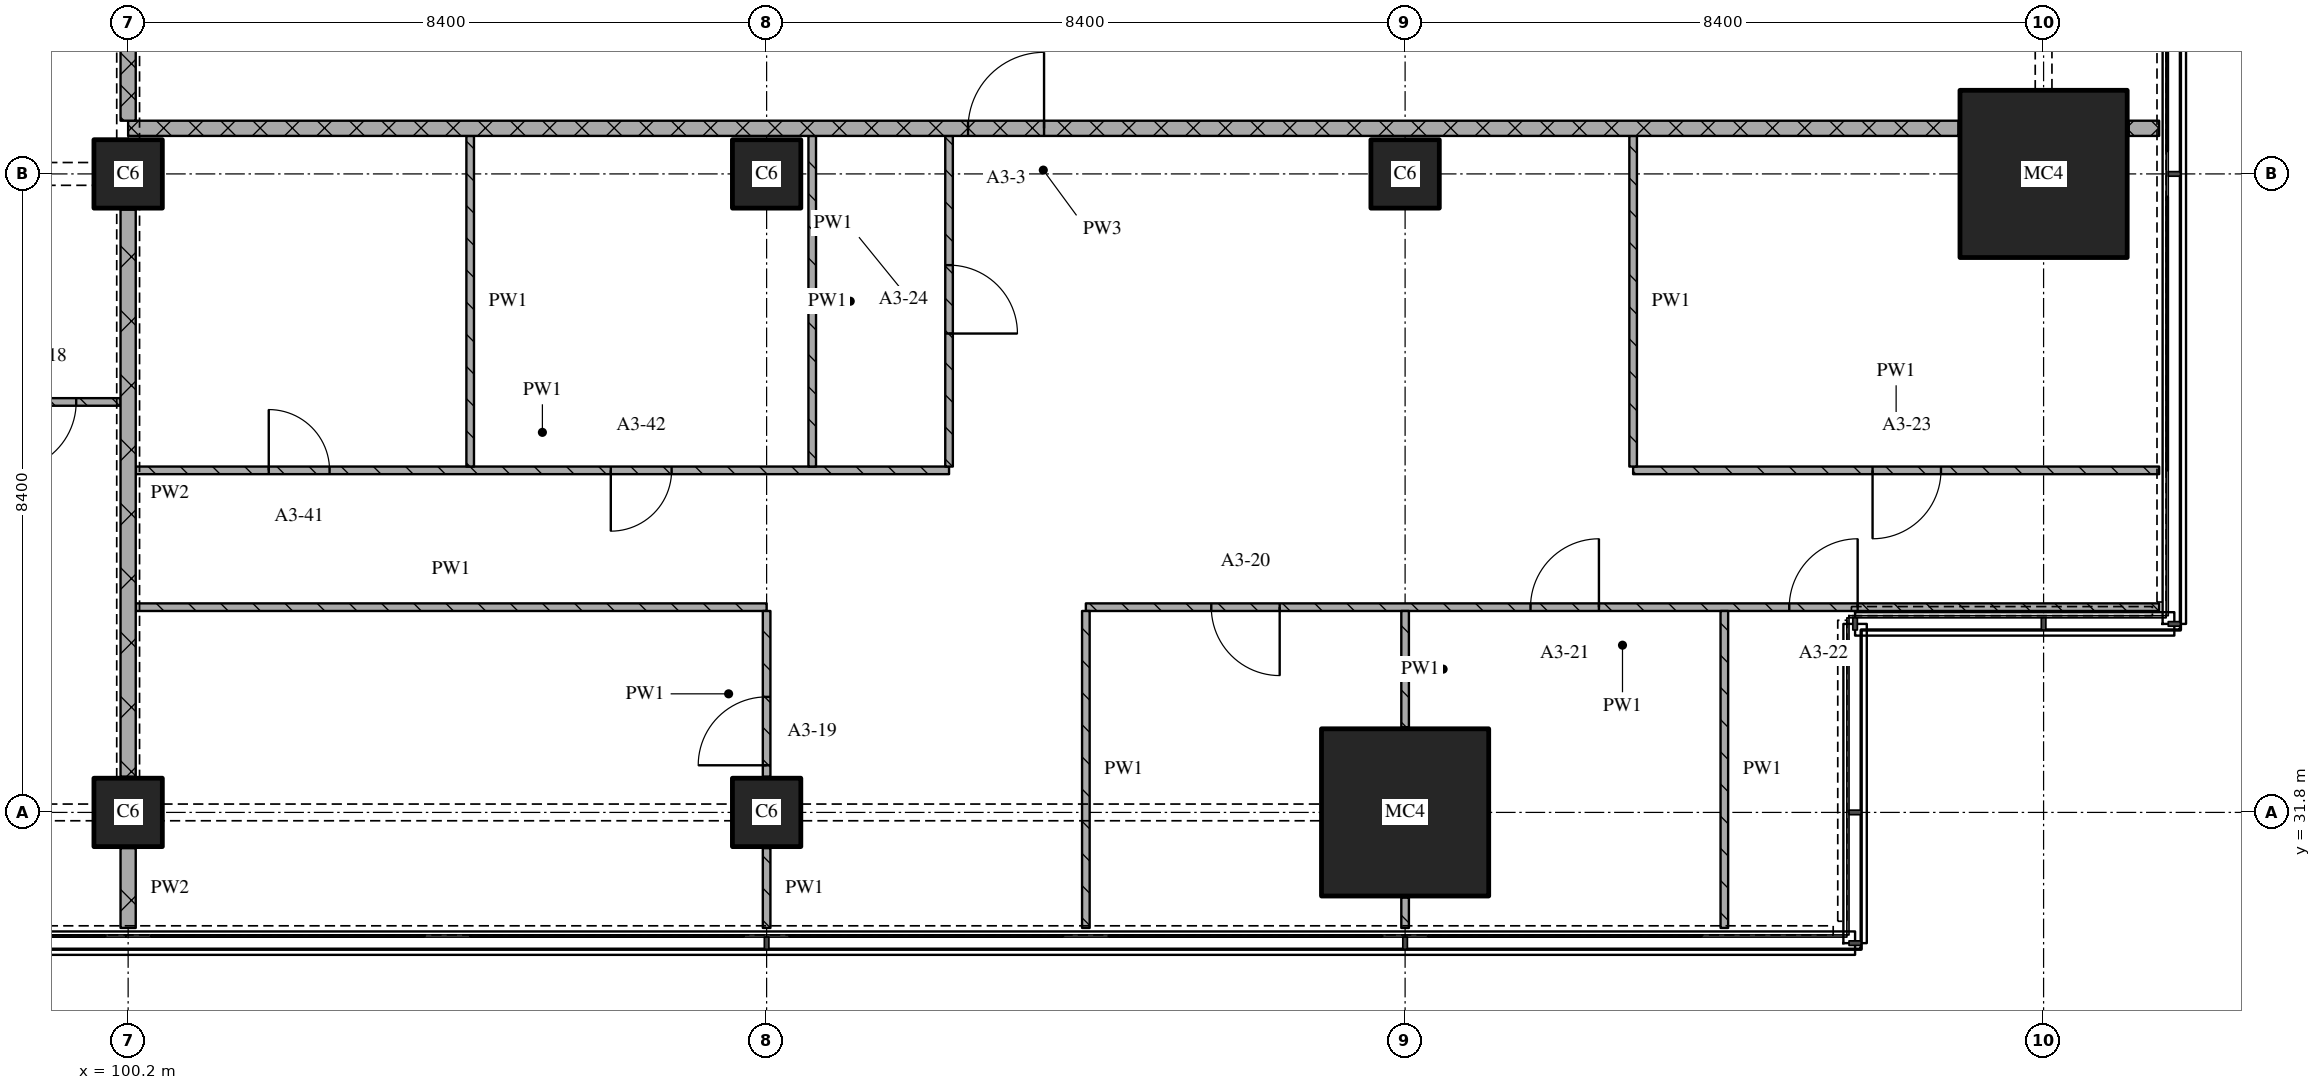
"""IFC4 building model, lengths in metres.
Left out: names, types, materials, properties, quantities, classifications, styles, units other than length and angle.
Written with IfcOpenShell. Run it as: python <this file> out.ifc"""

import sys

from ifc_helpers import new_model, si_unit, direction, frame, frame_2d, origin, origin_2d, place, context, subcontext, project, spatial, rectangle, extrude, element, fill, save


model = new_model("IFC4")
c1 = context("Model", 3, precision=1e-05, world=origin(), true_north=direction((0.0, 1.0)))
c2 = subcontext(c1, "Body", "Model", "MODEL_VIEW")
j1 = project(units=[si_unit("LENGTHUNIT", "METRE"), si_unit("PLANEANGLEUNIT", "RADIAN")], contexts=[c1])
p1 = place(None, origin())
s1 = spatial("IfcSite", under=j1, at=p1, CompositionType="ELEMENT")
p2 = place(p1, origin())
s2 = spatial("IfcBuilding", under=s1, at=p2, CompositionType="ELEMENT")
p3 = place(p2, frame((0.0, 0.0, 66.0)))
s3 = spatial("IfcBuildingStorey", under=s2, at=p3, CompositionType="ELEMENT", Elevation=66.0)
for number, where, z_axis, x_axis in (
    (1, (100.2, 31.8, 0.0), (0.0, 0.0, 1.0), (1.0, 0.0, 0.0)),
    (2, (100.2, 40.2, 0.0), (0.0, 0.0, 1.0), (1.0, 0.0, 0.0)),
    (3, (108.6, 31.8, 0.0), (0.0, 0.0, 1.0), (1.0, 0.0, 0.0)),
    (4, (108.6, 40.2, 0.0), (0.0, 0.0, 1.0), (1.0, 0.0, 0.0)),
):
    element("IfcColumn", number, at=place(p3, frame(where, z_axis=z_axis, x_axis=x_axis)), inside=s3, PredefinedType="COLUMN", context=c2, shape_type="SweptSolid", body=[
        extrude(rectangle(XDim=0.9, YDim=0.9, at=origin_2d()), origin(), (0.0, 0.0, 1.0), 3.6),
    ])
p4 = place(p3, frame((117.0, 31.8, 0.0), z_axis=(0.0, 0.0, 1.0), x_axis=(1.0, 0.0, 0.0)))
e5 = element("IfcColumn", 5, at=p4, inside=s3, PredefinedType="COLUMN", context=c2, shape_type="SweptSolid", body=[
    extrude(rectangle(XDim=2.2, YDim=2.2, at=origin_2d()), origin(), (0.0, 0.0, 1.0), 3.6),
])
p5 = place(p3, frame((117.0, 40.2, 0.0), z_axis=(0.0, 0.0, 1.0), x_axis=(1.0, 0.0, 0.0)))
e6 = element("IfcColumn", 6, at=p5, inside=s3, PredefinedType="COLUMN", context=c2, shape_type="SweptSolid", body=[
    extrude(rectangle(XDim=0.9, YDim=0.9, at=origin_2d()), origin(), (0.0, 0.0, 1.0), 3.6),
])
p6 = place(p3, frame((125.4, 40.2, 0.0), z_axis=(0.0, 0.0, 1.0), x_axis=(1.0, 0.0, 0.0)))
e7 = element("IfcColumn", 7, at=p6, inside=s3, PredefinedType="COLUMN", context=c2, shape_type="SweptSolid", body=[
    extrude(rectangle(XDim=2.2, YDim=2.2, at=origin_2d()), origin(), (0.0, 0.0, 1.0), 3.6),
])
p7 = place(p3, frame((100.3, 34.5, 0.0), z_axis=(0.0, 0.0, 1.0), x_axis=(1.0, 0.0, 0.0)))
e8 = element("IfcWall", 8, at=p7, inside=s3, PredefinedType="PARTITIONING", context=c2, shape_type="SweptSolid", body=[
    extrude(rectangle(XDim=8.3, YDim=0.1, at=frame_2d((4.15, 0.0))), origin(), (0.0, 0.0, 1.0), 3.32),
])
p8 = place(p3, frame((126.92, 34.5, 0.0), z_axis=(0.0, 0.0, 1.0), x_axis=(-1.0, 0.0, 0.0)))
e9 = element("IfcWall", 9, at=p8, inside=s3, PredefinedType="PARTITIONING", context=c2, shape_type="SweptSolid", body=[
    extrude(rectangle(XDim=14.12, YDim=0.1, at=frame_2d((7.06, 0.0))), origin(), (0.0, 0.0, 1.0), 3.32),
])
p9 = place(p8, frame((3.966, 0.0, 0.0)))
e10 = element("IfcOpeningElement", 10, at=p9, cuts=e9, PredefinedType="OPENING", context=c2, shape_type="SweptSolid", body=[
    extrude(rectangle(XDim=0.9, YDim=2.1, at=frame_2d((0.45, 1.05))), frame((0.0, 0.06, 0.0), z_axis=(0.0, -1.0, 0.0), x_axis=(1.0, 0.0, 0.0)), (0.0, 0.0, 1.0), 0.12),
])
p10 = place(p8, frame((7.37, 0.0, 0.0)))
e11 = element("IfcOpeningElement", 11, at=p10, cuts=e9, PredefinedType="OPENING", context=c2, shape_type="SweptSolid", body=[
    extrude(rectangle(XDim=0.9, YDim=2.1, at=frame_2d((0.45, 1.05))), frame((0.0, 0.06, 0.0), z_axis=(0.0, -1.0, 0.0), x_axis=(1.0, 0.0, 0.0)), (0.0, 0.0, 1.0), 0.12),
])
p11 = place(p8, frame((11.57, 0.0, 0.0)))
e12 = element("IfcOpeningElement", 12, at=p11, cuts=e9, PredefinedType="OPENING", context=c2, shape_type="SweptSolid", body=[
    extrude(rectangle(XDim=0.9, YDim=2.1, at=frame_2d((0.45, 1.05))), frame((0.0, 0.06, 0.0), z_axis=(0.0, -1.0, 0.0), x_axis=(1.0, 0.0, 0.0)), (0.0, 0.0, 1.0), 0.12),
])
p12 = place(p3, frame((100.3, 36.3, 0.0), z_axis=(0.0, 0.0, 1.0), x_axis=(1.0, 0.0, 0.0)))
e13 = element("IfcWall", 13, at=p12, inside=s3, PredefinedType="PARTITIONING", context=c2, shape_type="SweptSolid", body=[
    extrude(rectangle(XDim=10.7, YDim=0.1, at=frame_2d((5.35, 0.0))), origin(), (0.0, 0.0, 1.0), 3.32),
])
p13 = place(p12, frame((1.75, 0.0, 0.0)))
e14 = element("IfcOpeningElement", 14, at=p13, cuts=e13, PredefinedType="OPENING", context=c2, shape_type="SweptSolid", body=[
    extrude(rectangle(XDim=0.8, YDim=2.1, at=frame_2d((0.4, 1.05))), frame((0.0, 0.06, 0.0), z_axis=(0.0, -1.0, 0.0), x_axis=(1.0, 0.0, 0.0)), (0.0, 0.0, 1.0), 0.12),
])
p14 = place(p12, frame((6.25, 0.0, 0.0)))
e15 = element("IfcOpeningElement", 15, at=p14, cuts=e13, PredefinedType="OPENING", context=c2, shape_type="SweptSolid", body=[
    extrude(rectangle(XDim=0.8, YDim=2.1, at=frame_2d((0.4, 1.05))), frame((0.0, 0.06, 0.0), z_axis=(0.0, -1.0, 0.0), x_axis=(1.0, 0.0, 0.0)), (0.0, 0.0, 1.0), 0.12),
])
p15 = place(p3, frame((120.0, 36.3, 0.0), z_axis=(0.0, 0.0, 1.0), x_axis=(1.0, 0.0, 0.0)))
e16 = element("IfcWall", 16, at=p15, inside=s3, PredefinedType="PARTITIONING", context=c2, shape_type="SweptSolid", body=[
    extrude(rectangle(XDim=6.92, YDim=0.1, at=frame_2d((3.46, 0.0))), origin(), (0.0, 0.0, 1.0), 3.32),
])
p16 = place(p15, frame((3.15, 0.0, 0.0)))
e17 = element("IfcOpeningElement", 17, at=p16, cuts=e16, PredefinedType="OPENING", context=c2, shape_type="SweptSolid", body=[
    extrude(rectangle(XDim=0.9, YDim=2.1, at=frame_2d((0.45, 1.05))), frame((0.0, 0.06, 0.0), z_axis=(0.0, -1.0, 0.0), x_axis=(1.0, 0.0, 0.0)), (0.0, 0.0, 1.0), 0.12),
])
p17 = place(p3, frame((89.1, 37.2, 0.0), z_axis=(0.0, 0.0, 1.0), x_axis=(1.0, 0.0, 0.0)))
e18 = element("IfcWall", 18, at=p17, inside=s3, PredefinedType="PARTITIONING", context=c2, shape_type="SweptSolid", body=[
    extrude(rectangle(XDim=11.0, YDim=0.1, at=frame_2d((5.5, 0.0))), origin(), (0.0, 0.0, 1.0), 3.32),
])
p18 = place(p17, frame((6.225, 0.0, 0.0)))
e19 = element("IfcOpeningElement", 19, at=p18, cuts=e18, PredefinedType="OPENING", context=c2, shape_type="SweptSolid", body=[
    extrude(rectangle(XDim=0.8, YDim=2.1, at=frame_2d((0.4, 1.05))), frame((0.0, 0.06, 0.0), z_axis=(0.0, -1.0, 0.0), x_axis=(1.0, 0.0, 0.0)), (0.0, 0.0, 1.0), 0.12),
])
p19 = place(p17, frame((9.517, 0.0, 0.0)))
e20 = element("IfcOpeningElement", 20, at=p19, cuts=e18, PredefinedType="OPENING", context=c2, shape_type="SweptSolid", body=[
    extrude(rectangle(XDim=0.9, YDim=2.1, at=frame_2d((0.45, 1.05))), frame((0.0, 0.06, 0.0), z_axis=(0.0, -1.0, 0.0), x_axis=(1.0, 0.0, 0.0)), (0.0, 0.0, 1.0), 0.12),
])
p20 = place(p3, frame((124.28, 40.8, 0.0), z_axis=(0.0, 0.0, 1.0), x_axis=(-1.0, 0.0, 0.0)))
e21 = element("IfcWall", 21, at=p20, inside=s3, PredefinedType="PARTITIONING", context=c2, shape_type="SweptSolid", body=[
    extrude(rectangle(XDim=24.08, YDim=0.2, at=frame_2d((12.04, 0.0))), origin(), (0.0, 0.0, 1.0), 3.32),
])
p21 = place(p20, frame((12.03, 0.0, 0.0)))
e22 = element("IfcOpeningElement", 22, at=p21, cuts=e21, PredefinedType="OPENING", context=c2, shape_type="SweptSolid", body=[
    extrude(rectangle(XDim=1.0, YDim=2.1, at=frame_2d((0.5, 1.05))), frame((0.0, 0.11, 0.0), z_axis=(0.0, -1.0, 0.0), x_axis=(1.0, 0.0, 0.0)), (0.0, 0.0, 1.0), 0.22),
])
p22 = place(p3, frame((126.52, 40.8, 0.0), z_axis=(0.0, 0.0, 1.0), x_axis=(1.0, 0.0, 0.0)))
e23 = element("IfcWall", 23, at=p22, inside=s3, PredefinedType="PARTITIONING", context=c2, shape_type="SweptSolid", body=[
    extrude(rectangle(XDim=0.4, YDim=0.2, at=frame_2d((0.2, 0.0))), origin(), (0.0, 0.0, 1.0), 3.32),
])
p23 = place(p3, frame((100.2, 43.1, 0.0), z_axis=(0.0, 0.0, 1.0), x_axis=(0.0, -1.0, 0.0)))
e24 = element("IfcWall", 24, at=p23, inside=s3, PredefinedType="PARTITIONING", context=c2, shape_type="SweptSolid", body=[
    extrude(rectangle(XDim=2.2, YDim=0.2, at=frame_2d((1.1, 0.0))), origin(), (0.0, 0.0, 1.0), 2.43),
])
p24 = place(p3, frame((100.2, 31.33, 0.0), z_axis=(0.0, 0.0, 1.0), x_axis=(0.0, -1.0, 0.0)))
e25 = element("IfcWall", 25, at=p24, inside=s3, PredefinedType="PARTITIONING", context=c2, shape_type="SweptSolid", body=[
    extrude(rectangle(XDim=1.05, YDim=0.2, at=frame_2d((0.525, 0.0))), origin(), (0.0, 0.0, 1.0), 3.32),
])
p25 = place(p3, frame((100.2, 39.73, 0.0), z_axis=(0.0, 0.0, 1.0), x_axis=(0.0, -1.0, 0.0)))
e26 = element("IfcWall", 26, at=p25, inside=s3, PredefinedType="PARTITIONING", context=c2, shape_type="SweptSolid", body=[
    extrude(rectangle(XDim=7.46, YDim=0.2, at=frame_2d((3.73, 0.0))), origin(), (0.0, 0.0, 1.0), 2.83),
])
p26 = place(p3, frame((104.7, 40.7, 0.0), z_axis=(0.0, 0.0, 1.0), x_axis=(0.0, -1.0, 0.0)))
e27 = element("IfcWall", 27, at=p26, inside=s3, PredefinedType="PARTITIONING", context=c2, shape_type="SweptSolid", body=[
    extrude(rectangle(XDim=4.35, YDim=0.1, at=frame_2d((2.175, 0.0))), origin(), (0.0, 0.0, 1.0), 3.32),
])
p27 = place(p3, frame((108.6, 31.33, 0.0), z_axis=(0.0, 0.0, 1.0), x_axis=(0.0, -1.0, 0.0)))
e28 = element("IfcWall", 28, at=p27, inside=s3, PredefinedType="PARTITIONING", context=c2, shape_type="SweptSolid", body=[
    extrude(rectangle(XDim=1.05, YDim=0.1, at=frame_2d((0.525, 0.0))), origin(), (0.0, 0.0, 1.0), 3.32),
])
p28 = place(p3, frame((108.6, 32.27, 0.0), z_axis=(0.0, 0.0, 1.0), x_axis=(0.0, 1.0, 0.0)))
e29 = element("IfcWall", 29, at=p28, inside=s3, PredefinedType="PARTITIONING", context=c2, shape_type="SweptSolid", body=[
    extrude(rectangle(XDim=2.18, YDim=0.1, at=frame_2d((1.09, 0.0))), origin(), (0.0, 0.0, 1.0), 3.32),
])
p29 = place(p28, frame((0.15, 0.0, 0.0)))
e30 = element("IfcOpeningElement", 30, at=p29, cuts=e29, PredefinedType="OPENING", context=c2, shape_type="SweptSolid", body=[
    extrude(rectangle(XDim=0.9, YDim=2.1, at=frame_2d((0.45, 1.05))), frame((0.0, 0.06, 0.0), z_axis=(0.0, -1.0, 0.0), x_axis=(1.0, 0.0, 0.0)), (0.0, 0.0, 1.0), 0.12),
])
p30 = place(p3, frame((109.2, 40.7, 0.0), z_axis=(0.0, 0.0, 1.0), x_axis=(0.0, -1.0, 0.0)))
e31 = element("IfcWall", 31, at=p30, inside=s3, PredefinedType="PARTITIONING", context=c2, shape_type="SweptSolid", body=[
    extrude(rectangle(XDim=4.35, YDim=0.1, at=frame_2d((2.175, 0.0))), origin(), (0.0, 0.0, 1.0), 3.32),
])
p31 = place(p3, frame((111.0, 36.35, 0.0), z_axis=(0.0, 0.0, 1.0), x_axis=(0.0, 1.0, 0.0)))
e32 = element("IfcWall", 32, at=p31, inside=s3, PredefinedType="PARTITIONING", context=c2, shape_type="SweptSolid", body=[
    extrude(rectangle(XDim=4.35, YDim=0.1, at=frame_2d((2.175, 0.0))), origin(), (0.0, 0.0, 1.0), 3.32),
])
p32 = place(p31, frame((1.75, 0.0, 0.0)))
e33 = element("IfcOpeningElement", 33, at=p32, cuts=e32, PredefinedType="OPENING", context=c2, shape_type="SweptSolid", body=[
    extrude(rectangle(XDim=0.9, YDim=2.1, at=frame_2d((0.45, 1.05))), frame((0.0, 0.06, 0.0), z_axis=(0.0, -1.0, 0.0), x_axis=(1.0, 0.0, 0.0)), (0.0, 0.0, 1.0), 0.12),
])
p33 = place(p3, frame((112.8, 34.45, 0.0), z_axis=(0.0, 0.0, 1.0), x_axis=(0.0, -1.0, 0.0)))
e34 = element("IfcWall", 34, at=p33, inside=s3, PredefinedType="PARTITIONING", context=c2, shape_type="SweptSolid", body=[
    extrude(rectangle(XDim=4.17, YDim=0.1, at=frame_2d((2.085, 0.0))), origin(), (0.0, 0.0, 1.0), 3.32),
])
p34 = place(p3, frame((117.0, 30.68, 0.0), z_axis=(0.0, 0.0, 1.0), x_axis=(0.0, -1.0, 0.0)))
e35 = element("IfcWall", 35, at=p34, inside=s3, PredefinedType="PARTITIONING", context=c2, shape_type="SweptSolid", body=[
    extrude(rectangle(XDim=0.4, YDim=0.1, at=frame_2d((0.2, 0.0))), origin(), (0.0, 0.0, 1.0), 3.32),
])
p35 = place(p3, frame((117.0, 34.45, 0.0), z_axis=(0.0, 0.0, 1.0), x_axis=(0.0, -1.0, 0.0)))
e36 = element("IfcWall", 36, at=p35, inside=s3, PredefinedType="PARTITIONING", context=c2, shape_type="SweptSolid", body=[
    extrude(rectangle(XDim=1.53, YDim=0.1, at=frame_2d((0.765, 0.0))), origin(), (0.0, 0.0, 1.0), 3.32),
])
p36 = place(p3, frame((120.0, 40.7, 0.0), z_axis=(0.0, 0.0, 1.0), x_axis=(0.0, -1.0, 0.0)))
e37 = element("IfcWall", 37, at=p36, inside=s3, PredefinedType="PARTITIONING", context=c2, shape_type="SweptSolid", body=[
    extrude(rectangle(XDim=4.35, YDim=0.1, at=frame_2d((2.175, 0.0))), origin(), (0.0, 0.0, 1.0), 3.32),
])
p37 = place(p3, frame((121.2, 34.45, 0.0), z_axis=(0.0, 0.0, 1.0), x_axis=(0.0, -1.0, 0.0)))
e38 = element("IfcWall", 38, at=p37, inside=s3, PredefinedType="PARTITIONING", context=c2, shape_type="SweptSolid", body=[
    extrude(rectangle(XDim=4.17, YDim=0.1, at=frame_2d((2.085, 0.0))), origin(), (0.0, 0.0, 1.0), 3.32),
])
p38 = place(p9, origin())
e39 = element("IfcDoor", 39, at=p38, inside=s3, OperationType="SINGLE_SWING_RIGHT", PredefinedType="DOOR", context=c2, shape_type="SweptSolid", body=[
    extrude(rectangle(XDim=0.9, YDim=2.1, at=frame_2d((0.45, 1.05))), frame((0.0, 0.025, 0.0), z_axis=(0.0, -1.0, 0.0), x_axis=(1.0, 0.0, 0.0)), (0.0, 0.0, 1.0), 0.05),
])
fill(e10, e39)
p39 = place(p10, origin())
e40 = element("IfcDoor", 40, at=p39, inside=s3, OperationType="SINGLE_SWING_RIGHT", PredefinedType="DOOR", context=c2, shape_type="SweptSolid", body=[
    extrude(rectangle(XDim=0.9, YDim=2.1, at=frame_2d((0.45, 1.05))), frame((0.0, 0.025, 0.0), z_axis=(0.0, -1.0, 0.0), x_axis=(1.0, 0.0, 0.0)), (0.0, 0.0, 1.0), 0.05),
])
fill(e11, e40)
p40 = place(p11, origin())
e41 = element("IfcDoor", 41, at=p40, inside=s3, OperationType="SINGLE_SWING_LEFT", PredefinedType="DOOR", context=c2, shape_type="SweptSolid", body=[
    extrude(rectangle(XDim=0.9, YDim=2.1, at=frame_2d((0.45, 1.05))), frame((0.0, 0.025, 0.0), z_axis=(0.0, -1.0, 0.0), x_axis=(1.0, 0.0, 0.0)), (0.0, 0.0, 1.0), 0.05),
])
fill(e12, e41)
p41 = place(p13, origin())
e42 = element("IfcDoor", 42, at=p41, inside=s3, OperationType="SINGLE_SWING_LEFT", PredefinedType="DOOR", context=c2, shape_type="SweptSolid", body=[
    extrude(rectangle(XDim=0.8, YDim=2.1, at=frame_2d((0.4, 1.05))), frame((0.0, 0.025, 0.0), z_axis=(0.0, -1.0, 0.0), x_axis=(1.0, 0.0, 0.0)), (0.0, 0.0, 1.0), 0.05),
])
fill(e14, e42)
p42 = place(p14, origin())
e43 = element("IfcDoor", 43, at=p42, inside=s3, OperationType="SINGLE_SWING_RIGHT", PredefinedType="DOOR", context=c2, shape_type="SweptSolid", body=[
    extrude(rectangle(XDim=0.8, YDim=2.1, at=frame_2d((0.4, 1.05))), frame((0.0, 0.025, 0.0), z_axis=(0.0, -1.0, 0.0), x_axis=(1.0, 0.0, 0.0)), (0.0, 0.0, 1.0), 0.05),
])
fill(e15, e43)
p43 = place(p16, origin())
e44 = element("IfcDoor", 44, at=p43, inside=s3, OperationType="SINGLE_SWING_RIGHT", PredefinedType="DOOR", context=c2, shape_type="SweptSolid", body=[
    extrude(rectangle(XDim=0.9, YDim=2.1, at=frame_2d((0.45, 1.05))), frame((0.0, 0.025, 0.0), z_axis=(0.0, -1.0, 0.0), x_axis=(1.0, 0.0, 0.0)), (0.0, 0.0, 1.0), 0.05),
])
fill(e17, e44)
p44 = place(p19, origin())
e45 = element("IfcDoor", 45, at=p44, inside=s3, OperationType="SINGLE_SWING_RIGHT", PredefinedType="DOOR", context=c2, shape_type="SweptSolid", body=[
    extrude(rectangle(XDim=0.9, YDim=2.1, at=frame_2d((0.45, 1.05))), frame((0.0, 0.025, 0.0), z_axis=(0.0, -1.0, 0.0), x_axis=(1.0, 0.0, 0.0)), (0.0, 0.0, 1.0), 0.05),
])
fill(e20, e45)
p45 = place(p21, origin())
e46 = element("IfcDoor", 46, at=p45, inside=s3, OperationType="SINGLE_SWING_RIGHT", PredefinedType="DOOR", context=c2, shape_type="SweptSolid", body=[
    extrude(rectangle(XDim=1.0, YDim=2.1, at=frame_2d((0.5, 1.05))), frame((0.0, 0.025, 0.0), z_axis=(0.0, -1.0, 0.0), x_axis=(1.0, 0.0, 0.0)), (0.0, 0.0, 1.0), 0.05),
])
fill(e22, e46)
p46 = place(p29, origin())
e47 = element("IfcDoor", 47, at=p46, inside=s3, OperationType="SINGLE_SWING_LEFT", PredefinedType="DOOR", context=c2, shape_type="SweptSolid", body=[
    extrude(rectangle(XDim=0.9, YDim=2.1, at=frame_2d((0.45, 1.05))), frame((0.0, 0.025, 0.0), z_axis=(0.0, -1.0, 0.0), x_axis=(1.0, 0.0, 0.0)), (0.0, 0.0, 1.0), 0.05),
])
fill(e30, e47)
p47 = place(p32, origin())
e48 = element("IfcDoor", 48, at=p47, inside=s3, OperationType="SINGLE_SWING_RIGHT", PredefinedType="DOOR", context=c2, shape_type="SweptSolid", body=[
    extrude(rectangle(XDim=0.9, YDim=2.1, at=frame_2d((0.45, 1.05))), frame((0.0, 0.025, 0.0), z_axis=(0.0, -1.0, 0.0), x_axis=(1.0, 0.0, 0.0)), (0.0, 0.0, 1.0), 0.05),
])
fill(e33, e48)
save(model, sys.argv[1])
